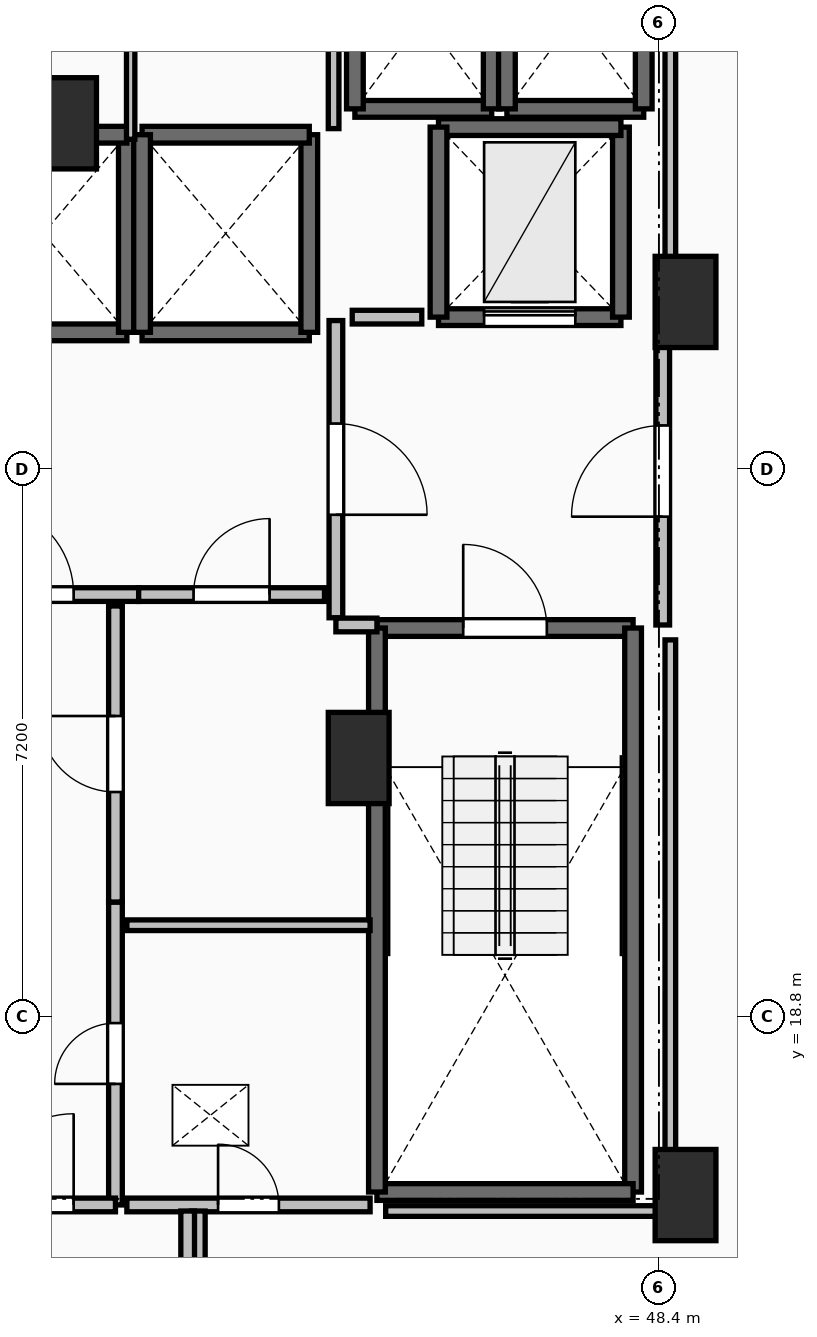
"""IFC4 building model, lengths in metres.
Left out: names, types, materials, properties, quantities, classifications, styles, units other than length and angle.
Written with IfcOpenShell. Run it as: python <this file> out.ifc"""

import sys

from ifc_helpers import new_model, si_unit, direction, frame, frame_2d, origin, origin_2d, place, context, subcontext, project, spatial, rectangle, extrude, element, fill, save


model = new_model("IFC4")
c1 = context("Model", 3, precision=1e-05, world=origin(), true_north=direction((0.0, 1.0)))
c2 = subcontext(c1, "Body", "Model", "MODEL_VIEW")
j1 = project(units=[si_unit("LENGTHUNIT", "METRE"), si_unit("PLANEANGLEUNIT", "RADIAN")], contexts=[c1])
p1 = place(None, origin())
s1 = spatial("IfcSite", under=j1, at=p1, CompositionType="ELEMENT")
p2 = place(p1, origin())
s2 = spatial("IfcBuilding", under=s1, at=p2, CompositionType="ELEMENT")
p3 = place(p2, frame((0.0, 0.0, 41.5)))
s3 = spatial("IfcBuildingStorey", under=s2, at=p3, CompositionType="ELEMENT", Elevation=41.5)
for number, where, z_axis, x_axis in (
    (1, (48.75, 28.2, 0.0), (0.0, 0.0, 1.0), (1.0, 0.0, 0.0)),
    (2, (48.75, 16.45, 0.0), (0.0, 0.0, 1.0), (1.0, 0.0, 0.0)),
    (3, (44.45, 22.2, 0.0), (0.0, 0.0, 1.0), (1.0, 0.0, 0.0)),
    (4, (40.6, 30.55, 0.0), (0.0, 0.0, 1.0), (1.0, 0.0, 0.0)),
):
    element("IfcColumn", number, at=place(p3, frame(where, z_axis=z_axis, x_axis=x_axis)), inside=s3, PredefinedType="PILASTER", context=c2, shape_type="SweptSolid", body=[
        extrude(rectangle(XDim=0.8, YDim=1.2, at=origin_2d()), origin(), (0.0, 0.0, 1.0), 3.5),
    ])
p4 = place(p3, frame((44.69, 23.91, 0.0), z_axis=(0.0, 0.0, 1.0), x_axis=(1.0, 0.0, 0.0)))
e5 = element("IfcWall", 5, at=p4, inside=s3, PredefinedType="SOLIDWALL", context=c2, shape_type="SweptSolid", body=[
    extrude(rectangle(XDim=3.37, YDim=0.22, at=frame_2d((1.685, 0.0))), origin(), (0.0, 0.0, 1.0), 3.24),
])
p5 = place(p4, frame((1.135, 0.0, 0.0)))
e6 = element("IfcOpeningElement", 6, at=p5, cuts=e5, PredefinedType="OPENING", context=c2, shape_type="SweptSolid", body=[
    extrude(rectangle(XDim=1.1, YDim=2.15, at=frame_2d((0.55, 1.075))), frame((0.0, 0.125, 0.0), z_axis=(0.0, -1.0, 0.0), x_axis=(1.0, 0.0, 0.0)), (0.0, 0.0, 1.0), 0.25),
])
p6 = place(p3, frame((48.06, 23.91, 0.0), z_axis=(0.0, 0.0, 1.0), x_axis=(0.0, -1.0, 0.0)))
e7 = element("IfcWall", 7, at=p6, inside=s3, PredefinedType="SOLIDWALL", context=c2, shape_type="SweptSolid", body=[
    extrude(rectangle(XDim=7.42, YDim=0.22, at=frame_2d((3.71, 0.0))), origin(), (0.0, 0.0, 1.0), 3.24),
])
p7 = place(p3, frame((48.06, 16.49, 0.0), z_axis=(0.0, 0.0, 1.0), x_axis=(-1.0, 0.0, 0.0)))
e8 = element("IfcWall", 8, at=p7, inside=s3, PredefinedType="SOLIDWALL", context=c2, shape_type="SweptSolid", body=[
    extrude(rectangle(XDim=3.37, YDim=0.22, at=frame_2d((1.685, 0.0))), origin(), (0.0, 0.0, 1.0), 3.24),
])
p8 = place(p3, frame((44.69, 16.49, 0.0), z_axis=(0.0, 0.0, 1.0), x_axis=(0.0, 1.0, 0.0)))
e9 = element("IfcWall", 9, at=p8, inside=s3, PredefinedType="SOLIDWALL", context=c2, shape_type="SweptSolid", body=[
    extrude(rectangle(XDim=7.42, YDim=0.22, at=frame_2d((3.71, 0.0))), origin(), (0.0, 0.0, 1.0), 3.24),
])
p9 = place(p3, frame((39.2, 27.8, 0.0), z_axis=(0.0, 0.0, 1.0), x_axis=(1.0, 0.0, 0.0)))
e10 = element("IfcWall", 10, at=p9, inside=s3, PredefinedType="SOLIDWALL", context=c2, shape_type="SweptSolid", body=[
    extrude(rectangle(XDim=2.2, YDim=0.22, at=frame_2d((1.1, 0.0))), origin(), (0.0, 0.0, 1.0), 3.24),
])
p10 = place(p3, frame((41.4, 27.8, 0.0), z_axis=(0.0, 0.0, 1.0), x_axis=(0.0, 1.0, 0.0)))
e11 = element("IfcWall", 11, at=p10, inside=s3, PredefinedType="SOLIDWALL", context=c2, shape_type="SweptSolid", body=[
    extrude(rectangle(XDim=2.6, YDim=0.22, at=frame_2d((1.3, 0.0))), origin(), (0.0, 0.0, 1.0), 3.24),
])
for number, where, z_axis, x_axis in (
    (12, (41.4, 30.4, 0.0), (0.0, 0.0, 1.0), (-1.0, 0.0, 0.0)),
    (13, (41.6, 27.8, 0.0), (0.0, 0.0, 1.0), (1.0, 0.0, 0.0)),
):
    element("IfcWall", number, at=place(p3, frame(where, z_axis=z_axis, x_axis=x_axis)), inside=s3, PredefinedType="SOLIDWALL", context=c2, shape_type="SweptSolid", body=[
        extrude(rectangle(XDim=2.2, YDim=0.22, at=frame_2d((1.1, 0.0))), origin(), (0.0, 0.0, 1.0), 3.24),
    ])
p11 = place(p3, frame((43.8, 27.8, 0.0), z_axis=(0.0, 0.0, 1.0), x_axis=(0.0, 1.0, 0.0)))
e14 = element("IfcWall", 14, at=p11, inside=s3, PredefinedType="SOLIDWALL", context=c2, shape_type="SweptSolid", body=[
    extrude(rectangle(XDim=2.6, YDim=0.22, at=frame_2d((1.3, 0.0))), origin(), (0.0, 0.0, 1.0), 3.24),
])
p12 = place(p3, frame((43.8, 30.4, 0.0), z_axis=(0.0, 0.0, 1.0), x_axis=(-1.0, 0.0, 0.0)))
e15 = element("IfcWall", 15, at=p12, inside=s3, PredefinedType="SOLIDWALL", context=c2, shape_type="SweptSolid", body=[
    extrude(rectangle(XDim=2.2, YDim=0.22, at=frame_2d((1.1, 0.0))), origin(), (0.0, 0.0, 1.0), 3.24),
])
p13 = place(p3, frame((41.6, 30.4, 0.0), z_axis=(0.0, 0.0, 1.0), x_axis=(0.0, -1.0, 0.0)))
e16 = element("IfcWall", 16, at=p13, inside=s3, PredefinedType="SOLIDWALL", context=c2, shape_type="SweptSolid", body=[
    extrude(rectangle(XDim=2.6, YDim=0.22, at=frame_2d((1.3, 0.0))), origin(), (0.0, 0.0, 1.0), 3.24),
])
p14 = place(p3, frame((44.4, 30.74, 0.0), z_axis=(0.0, 0.0, 1.0), x_axis=(1.0, 0.0, 0.0)))
e17 = element("IfcWall", 17, at=p14, inside=s3, PredefinedType="SOLIDWALL", context=c2, shape_type="SweptSolid", body=[
    extrude(rectangle(XDim=1.8, YDim=0.22, at=frame_2d((0.9, 0.0))), origin(), (0.0, 0.0, 1.0), 3.24),
])
for number, where, z_axis, x_axis in (
    (18, (46.2, 30.74, 0.0), (0.0, 0.0, 1.0), (0.0, 1.0, 0.0)),
    (19, (44.4, 33.16, 0.0), (0.0, 0.0, 1.0), (0.0, -1.0, 0.0)),
):
    element("IfcWall", number, at=place(p3, frame(where, z_axis=z_axis, x_axis=x_axis)), inside=s3, PredefinedType="SOLIDWALL", context=c2, shape_type="SweptSolid", body=[
        extrude(rectangle(XDim=2.42, YDim=0.22, at=frame_2d((1.21, 0.0))), origin(), (0.0, 0.0, 1.0), 3.24),
    ])
p15 = place(p3, frame((46.4, 30.74, 0.0), z_axis=(0.0, 0.0, 1.0), x_axis=(1.0, 0.0, 0.0)))
e20 = element("IfcWall", 20, at=p15, inside=s3, PredefinedType="SOLIDWALL", context=c2, shape_type="SweptSolid", body=[
    extrude(rectangle(XDim=1.8, YDim=0.22, at=frame_2d((0.9, 0.0))), origin(), (0.0, 0.0, 1.0), 3.24),
])
for number, where, z_axis, x_axis in (
    (21, (48.2, 30.74, 0.0), (0.0, 0.0, 1.0), (0.0, 1.0, 0.0)),
    (22, (46.4, 33.16, 0.0), (0.0, 0.0, 1.0), (0.0, -1.0, 0.0)),
):
    element("IfcWall", number, at=place(p3, frame(where, z_axis=z_axis, x_axis=x_axis)), inside=s3, PredefinedType="SOLIDWALL", context=c2, shape_type="SweptSolid", body=[
        extrude(rectangle(XDim=2.42, YDim=0.22, at=frame_2d((1.21, 0.0))), origin(), (0.0, 0.0, 1.0), 3.24),
    ])
p16 = place(p3, frame((45.5, 28.0, 0.0), z_axis=(0.0, 0.0, 1.0), x_axis=(1.0, 0.0, 0.0)))
e23 = element("IfcWall", 23, at=p16, inside=s3, PredefinedType="SHEAR", context=c2, shape_type="SweptSolid", body=[
    extrude(rectangle(XDim=2.4, YDim=0.22, at=frame_2d((1.2, 0.0))), origin(), (0.0, 0.0, 1.0), 3.24),
])
p17 = place(p16, frame((0.6, 0.0, 0.0)))
e24 = element("IfcOpeningElement", 24, at=p17, cuts=e23, PredefinedType="OPENING", context=c2, shape_type="SweptSolid", body=[
    extrude(rectangle(XDim=1.2, YDim=2.2, at=frame_2d((0.6, 1.1))), frame((0.0, 0.125, 0.0), z_axis=(0.0, -1.0, 0.0), x_axis=(1.0, 0.0, 0.0)), (0.0, 0.0, 1.0), 0.25),
])
p18 = place(p3, frame((47.9, 28.0, 0.0), z_axis=(0.0, 0.0, 1.0), x_axis=(0.0, 1.0, 0.0)))
e25 = element("IfcWall", 25, at=p18, inside=s3, PredefinedType="SHEAR", context=c2, shape_type="SweptSolid", body=[
    extrude(rectangle(XDim=2.5, YDim=0.22, at=frame_2d((1.25, 0.0))), origin(), (0.0, 0.0, 1.0), 3.24),
])
p19 = place(p3, frame((47.9, 30.5, 0.0), z_axis=(0.0, 0.0, 1.0), x_axis=(-1.0, 0.0, 0.0)))
e26 = element("IfcWall", 26, at=p19, inside=s3, PredefinedType="SHEAR", context=c2, shape_type="SweptSolid", body=[
    extrude(rectangle(XDim=2.4, YDim=0.22, at=frame_2d((1.2, 0.0))), origin(), (0.0, 0.0, 1.0), 3.24),
])
p20 = place(p3, frame((45.5, 30.5, 0.0), z_axis=(0.0, 0.0, 1.0), x_axis=(0.0, -1.0, 0.0)))
e27 = element("IfcWall", 27, at=p20, inside=s3, PredefinedType="SHEAR", context=c2, shape_type="SweptSolid", body=[
    extrude(rectangle(XDim=2.5, YDim=0.22, at=frame_2d((1.25, 0.0))), origin(), (0.0, 0.0, 1.0), 3.24),
])
p21 = place(p3, frame((44.15, 27.955, 0.0), z_axis=(0.0, 0.0, 1.0), x_axis=(0.0, -1.0, 0.0)))
e28 = element("IfcWall", 28, at=p21, inside=s3, PredefinedType="PARTITIONING", context=c2, shape_type="SweptSolid", body=[
    extrude(rectangle(XDim=3.91, YDim=0.18, at=frame_2d((1.955, 0.0))), origin(), (0.0, 0.0, 1.0), 3.24),
])
p22 = place(p21, frame((1.355, 0.0, 0.0)))
e29 = element("IfcOpeningElement", 29, at=p22, cuts=e28, PredefinedType="OPENING", context=c2, shape_type="SweptSolid", body=[
    extrude(rectangle(XDim=1.2, YDim=2.15, at=frame_2d((0.6, 1.075))), frame((0.0, 0.105, 0.0), z_axis=(0.0, -1.0, 0.0), x_axis=(1.0, 0.0, 0.0)), (0.0, 0.0, 1.0), 0.21),
])
p23 = place(p3, frame((44.15, 23.95, 0.0), z_axis=(0.0, 0.0, 1.0), x_axis=(1.0, 0.0, 0.0)))
e30 = element("IfcWall", 30, at=p23, inside=s3, PredefinedType="PARTITIONING", context=c2, shape_type="SweptSolid", body=[
    extrude(rectangle(XDim=0.54, YDim=0.18, at=frame_2d((0.27, 0.0))), origin(), (0.0, 0.0, 1.0), 3.24),
])
p24 = place(p3, frame((48.45, 23.95, 0.0), z_axis=(0.0, 0.0, 1.0), x_axis=(0.0, 1.0, 0.0)))
e31 = element("IfcWall", 31, at=p24, inside=s3, PredefinedType="PARTITIONING", context=c2, shape_type="SweptSolid", body=[
    extrude(rectangle(XDim=4.05, YDim=0.18, at=frame_2d((2.025, 0.0))), origin(), (0.0, 0.0, 1.0), 3.24),
])
p25 = place(p24, frame((1.425, 0.0, 0.0)))
e32 = element("IfcOpeningElement", 32, at=p25, cuts=e31, PredefinedType="OPENING", context=c2, shape_type="SweptSolid", body=[
    extrude(rectangle(XDim=1.2, YDim=2.15, at=frame_2d((0.6, 1.075))), frame((0.0, 0.105, 0.0), z_axis=(0.0, -1.0, 0.0), x_axis=(1.0, 0.0, 0.0)), (0.0, 0.0, 1.0), 0.21),
])
p26 = place(p3, frame((38.645, 24.35, 0.0), z_axis=(0.0, 0.0, 1.0), x_axis=(1.0, 0.0, 0.0)))
e33 = element("IfcWall", 33, at=p26, inside=s3, PredefinedType="PARTITIONING", context=c2, shape_type="SweptSolid", body=[
    extrude(rectangle(XDim=2.91, YDim=0.18, at=frame_2d((1.455, 0.0))), origin(), (0.0, 0.0, 1.0), 3.24),
])
p27 = place(p26, frame((0.855, 0.0, 0.0)))
e34 = element("IfcOpeningElement", 34, at=p27, cuts=e33, PredefinedType="OPENING", context=c2, shape_type="SweptSolid", body=[
    extrude(rectangle(XDim=1.2, YDim=2.15, at=frame_2d((0.6, 1.075))), frame((0.0, 0.105, 0.0), z_axis=(0.0, -1.0, 0.0), x_axis=(1.0, 0.0, 0.0)), (0.0, 0.0, 1.0), 0.21),
])
p28 = place(p3, frame((41.555, 24.35, 0.0), z_axis=(0.0, 0.0, 1.0), x_axis=(1.0, 0.0, 0.0)))
e35 = element("IfcWall", 35, at=p28, inside=s3, PredefinedType="PARTITIONING", context=c2, shape_type="SweptSolid", body=[
    extrude(rectangle(XDim=2.445, YDim=0.18, at=frame_2d((1.223, 0.0))), origin(), (0.0, 0.0, 1.0), 3.24),
])
p29 = place(p28, frame((0.722, 0.0, 0.0)))
e36 = element("IfcOpeningElement", 36, at=p29, cuts=e35, PredefinedType="OPENING", context=c2, shape_type="SweptSolid", body=[
    extrude(rectangle(XDim=1.0, YDim=2.15, at=frame_2d((0.5, 1.075))), frame((0.0, 0.105, 0.0), z_axis=(0.0, -1.0, 0.0), x_axis=(1.0, 0.0, 0.0)), (0.0, 0.0, 1.0), 0.21),
])
p30 = place(p3, frame((41.25, 16.32, 0.0), z_axis=(0.0, 0.0, 1.0), x_axis=(0.0, 1.0, 0.0)))
e37 = element("IfcWall", 37, at=p30, inside=s3, PredefinedType="PARTITIONING", context=c2, shape_type="SweptSolid", body=[
    extrude(rectangle(XDim=3.985, YDim=0.18, at=frame_2d((1.992, 0.0))), origin(), (0.0, 0.0, 1.0), 3.24),
])
p31 = place(p30, frame((1.593, 0.0, 0.0)))
e38 = element("IfcOpeningElement", 38, at=p31, cuts=e37, PredefinedType="OPENING", context=c2, shape_type="SweptSolid", body=[
    extrude(rectangle(XDim=0.8, YDim=2.05, at=frame_2d((0.4, 1.025))), frame((0.0, 0.105, 0.0), z_axis=(0.0, -1.0, 0.0), x_axis=(1.0, 0.0, 0.0)), (0.0, 0.0, 1.0), 0.21),
])
p32 = place(p3, frame((41.25, 20.305, 0.0), z_axis=(0.0, 0.0, 1.0), x_axis=(0.0, 1.0, 0.0)))
e39 = element("IfcWall", 39, at=p32, inside=s3, PredefinedType="PARTITIONING", context=c2, shape_type="SweptSolid", body=[
    extrude(rectangle(XDim=3.895, YDim=0.18, at=frame_2d((1.948, 0.0))), origin(), (0.0, 0.0, 1.0), 3.24),
])
p33 = place(p32, frame((1.448, 0.0, 0.0)))
e40 = element("IfcOpeningElement", 40, at=p33, cuts=e39, PredefinedType="OPENING", context=c2, shape_type="SweptSolid", body=[
    extrude(rectangle(XDim=1.0, YDim=2.15, at=frame_2d((0.5, 1.075))), frame((0.0, 0.105, 0.0), z_axis=(0.0, -1.0, 0.0), x_axis=(1.0, 0.0, 0.0)), (0.0, 0.0, 1.0), 0.21),
])
p34 = place(p3, frame((38.95, 16.32, 0.0), z_axis=(0.0, 0.0, 1.0), x_axis=(1.0, 0.0, 0.0)))
e41 = element("IfcWall", 41, at=p34, inside=s3, PredefinedType="PARTITIONING", context=c2, shape_type="SweptSolid", body=[
    extrude(rectangle(XDim=2.3, YDim=0.18, at=frame_2d((1.15, 0.0))), origin(), (0.0, 0.0, 1.0), 3.24),
])
p35 = place(p34, frame((0.55, 0.0, 0.0)))
e42 = element("IfcOpeningElement", 42, at=p35, cuts=e41, PredefinedType="OPENING", context=c2, shape_type="SweptSolid", body=[
    extrude(rectangle(XDim=1.2, YDim=2.15, at=frame_2d((0.6, 1.075))), frame((0.0, 0.105, 0.0), z_axis=(0.0, -1.0, 0.0), x_axis=(1.0, 0.0, 0.0)), (0.0, 0.0, 1.0), 0.21),
])
p36 = place(p3, frame((44.6, 20.0, 0.0), z_axis=(0.0, 0.0, 1.0), x_axis=(-1.0, 0.0, 0.0)))
e43 = element("IfcWall", 43, at=p36, inside=s3, PredefinedType="PARTITIONING", context=c2, shape_type="SweptSolid", body=[
    extrude(rectangle(XDim=3.2, YDim=0.14, at=frame_2d((1.6, 0.0))), origin(), (0.0, 0.0, 1.0), 3.24),
])
p37 = place(p3, frame((41.4, 16.32, 0.0), z_axis=(0.0, 0.0, 1.0), x_axis=(1.0, 0.0, 0.0)))
e44 = element("IfcWall", 44, at=p37, inside=s3, PredefinedType="PARTITIONING", context=c2, shape_type="SweptSolid", body=[
    extrude(rectangle(XDim=3.2, YDim=0.18, at=frame_2d((1.6, 0.0))), origin(), (0.0, 0.0, 1.0), 3.24),
])
p38 = place(p37, frame((1.2, 0.0, 0.0)))
e45 = element("IfcOpeningElement", 45, at=p38, cuts=e44, PredefinedType="OPENING", context=c2, shape_type="SweptSolid", body=[
    extrude(rectangle(XDim=0.8, YDim=2.05, at=frame_2d((0.4, 1.025))), frame((0.0, 0.105, 0.0), z_axis=(0.0, -1.0, 0.0), x_axis=(1.0, 0.0, 0.0)), (0.0, 0.0, 1.0), 0.21),
])
p39 = place(p3, frame((41.45, 30.34, 0.0), z_axis=(0.0, 0.0, 1.0), x_axis=(0.0, 1.0, 0.0)))
e46 = element("IfcWall", 46, at=p39, inside=s3, PredefinedType="PARTITIONING", context=c2, shape_type="SweptSolid", body=[
    extrude(rectangle(XDim=3.56, YDim=0.11, at=frame_2d((1.78, 0.0))), origin(), (0.0, 0.0, 1.0), 3.24),
])
for number, where, z_axis, x_axis in (
    (47, (42.34, 16.24, 0.0), (0.0, 0.0, 1.0), (0.0, -1.0, 0.0)),
    (48, (42.2, 14.1, 0.0), (0.0, 0.0, 1.0), (0.0, 1.0, 0.0)),
):
    element("IfcWall", number, at=place(p3, frame(where, z_axis=z_axis, x_axis=x_axis)), inside=s3, PredefinedType="PARTITIONING", context=c2, shape_type="SweptSolid", body=[
        extrude(rectangle(XDim=2.14, YDim=0.18, at=frame_2d((1.07, 0.0))), origin(), (0.0, 0.0, 1.0), 3.24),
    ])
p40 = place(p3, frame((45.28, 28.0, 0.0), z_axis=(0.0, 0.0, 1.0), x_axis=(-1.0, 0.0, 0.0)))
e49 = element("IfcWall", 49, at=p40, inside=s3, PredefinedType="PARTITIONING", context=c2, shape_type="SweptSolid", body=[
    extrude(rectangle(XDim=0.915, YDim=0.18, at=frame_2d((0.458, 0.0))), origin(), (0.0, 0.0, 1.0), 3.24),
])
p41 = place(p3, frame((44.12, 30.48, 0.0), z_axis=(0.0, 0.0, 1.0), x_axis=(0.0, 1.0, 0.0)))
e50 = element("IfcWall", 50, at=p41, inside=s3, PredefinedType="PARTITIONING", context=c2, shape_type="SweptSolid", body=[
    extrude(rectangle(XDim=2.41, YDim=0.14, at=frame_2d((1.205, 0.0))), origin(), (0.0, 0.0, 1.0), 3.24),
])
p42 = place(p3, frame((48.55, 33.45, 0.0), z_axis=(0.0, 0.0, 1.0), x_axis=(0.0, -1.0, 0.0)))
e51 = element("IfcWall", 51, at=p42, inside=s3, PredefinedType="PARTITIONING", context=c2, shape_type="SweptSolid", body=[
    extrude(rectangle(XDim=5.254, YDim=0.14, at=frame_2d((2.627, 0.0))), origin(), (0.0, 0.0, 1.0), 2.432),
])
p43 = place(p3, frame((48.55, 23.754, 0.0), z_axis=(0.0, 0.0, 1.0), x_axis=(0.0, -1.0, 0.0)))
e52 = element("IfcWall", 52, at=p43, inside=s3, PredefinedType="PARTITIONING", context=c2, shape_type="SweptSolid", body=[
    extrude(rectangle(XDim=7.514, YDim=0.14, at=frame_2d((3.757, 0.0))), origin(), (0.0, 0.0, 1.0), 2.432),
])
p44 = place(p3, frame((48.55, 16.24, 0.0), z_axis=(0.0, 0.0, 1.0), x_axis=(-1.0, 0.0, 0.0)))
e53 = element("IfcWall", 53, at=p44, inside=s3, PredefinedType="PARTITIONING", context=c2, shape_type="SweptSolid", body=[
    extrude(rectangle(XDim=3.745, YDim=0.14, at=frame_2d((1.873, 0.0))), origin(), (0.0, 0.0, 1.0), 2.432),
])
p45 = place(p5, origin())
e54 = element("IfcDoor", 54, at=p45, inside=s3, OperationType="SINGLE_SWING_LEFT", PredefinedType="DOOR", context=c2, shape_type="SweptSolid", body=[
    extrude(rectangle(XDim=1.1, YDim=2.15, at=frame_2d((0.55, 1.075))), frame((0.0, 0.025, 0.0), z_axis=(0.0, -1.0, 0.0), x_axis=(1.0, 0.0, 0.0)), (0.0, 0.0, 1.0), 0.05),
])
fill(e6, e54)
p46 = place(p17, origin())
e55 = element("IfcDoor", 55, at=p46, inside=s3, OperationType="SLIDING_TO_LEFT", PredefinedType="DOOR", context=c2, shape_type="SweptSolid", body=[
    extrude(rectangle(XDim=1.2, YDim=2.2, at=frame_2d((0.6, 1.1))), frame((0.0, 0.025, 0.0), z_axis=(0.0, -1.0, 0.0), x_axis=(1.0, 0.0, 0.0)), (0.0, 0.0, 1.0), 0.05),
])
fill(e24, e55)
p47 = place(p22, origin())
e56 = element("IfcDoor", 56, at=p47, inside=s3, OperationType="SINGLE_SWING_RIGHT", PredefinedType="DOOR", context=c2, shape_type="SweptSolid", body=[
    extrude(rectangle(XDim=1.2, YDim=2.15, at=frame_2d((0.6, 1.075))), frame((0.0, 0.025, 0.0), z_axis=(0.0, -1.0, 0.0), x_axis=(1.0, 0.0, 0.0)), (0.0, 0.0, 1.0), 0.05),
])
fill(e29, e56)
p48 = place(p25, origin())
e57 = element("IfcDoor", 57, at=p48, inside=s3, OperationType="SINGLE_SWING_LEFT", PredefinedType="DOOR", context=c2, shape_type="SweptSolid", body=[
    extrude(rectangle(XDim=1.2, YDim=2.15, at=frame_2d((0.6, 1.075))), frame((0.0, 0.025, 0.0), z_axis=(0.0, -1.0, 0.0), x_axis=(1.0, 0.0, 0.0)), (0.0, 0.0, 1.0), 0.05),
])
fill(e32, e57)
p49 = place(p27, origin())
e58 = element("IfcDoor", 58, at=p49, inside=s3, OperationType="SINGLE_SWING_LEFT", PredefinedType="DOOR", context=c2, shape_type="SweptSolid", body=[
    extrude(rectangle(XDim=1.2, YDim=2.15, at=frame_2d((0.6, 1.075))), frame((0.0, 0.025, 0.0), z_axis=(0.0, -1.0, 0.0), x_axis=(1.0, 0.0, 0.0)), (0.0, 0.0, 1.0), 0.05),
])
fill(e34, e58)
p50 = place(p29, origin())
e59 = element("IfcDoor", 59, at=p50, inside=s3, OperationType="SINGLE_SWING_RIGHT", PredefinedType="DOOR", context=c2, shape_type="SweptSolid", body=[
    extrude(rectangle(XDim=1.0, YDim=2.15, at=frame_2d((0.5, 1.075))), frame((0.0, 0.025, 0.0), z_axis=(0.0, -1.0, 0.0), x_axis=(1.0, 0.0, 0.0)), (0.0, 0.0, 1.0), 0.05),
])
fill(e36, e59)
p51 = place(p31, origin())
e60 = element("IfcDoor", 60, at=p51, inside=s3, OperationType="SINGLE_SWING_LEFT", PredefinedType="DOOR", context=c2, shape_type="SweptSolid", body=[
    extrude(rectangle(XDim=0.8, YDim=2.05, at=frame_2d((0.4, 1.025))), frame((0.0, 0.025, 0.0), z_axis=(0.0, -1.0, 0.0), x_axis=(1.0, 0.0, 0.0)), (0.0, 0.0, 1.0), 0.05),
])
fill(e38, e60)
p52 = place(p33, origin())
e61 = element("IfcDoor", 61, at=p52, inside=s3, OperationType="SINGLE_SWING_RIGHT", PredefinedType="DOOR", context=c2, shape_type="SweptSolid", body=[
    extrude(rectangle(XDim=1.0, YDim=2.15, at=frame_2d((0.5, 1.075))), frame((0.0, 0.025, 0.0), z_axis=(0.0, -1.0, 0.0), x_axis=(1.0, 0.0, 0.0)), (0.0, 0.0, 1.0), 0.05),
])
fill(e40, e61)
p53 = place(p35, origin())
e62 = element("IfcDoor", 62, at=p53, inside=s3, OperationType="SINGLE_SWING_RIGHT", PredefinedType="DOOR", context=c2, shape_type="SweptSolid", body=[
    extrude(rectangle(XDim=1.2, YDim=2.15, at=frame_2d((0.6, 1.075))), frame((0.0, 0.025, 0.0), z_axis=(0.0, -1.0, 0.0), x_axis=(1.0, 0.0, 0.0)), (0.0, 0.0, 1.0), 0.05),
])
fill(e42, e62)
p54 = place(p38, origin())
e63 = element("IfcDoor", 63, at=p54, inside=s3, OperationType="SINGLE_SWING_LEFT", PredefinedType="DOOR", context=c2, shape_type="SweptSolid", body=[
    extrude(rectangle(XDim=0.8, YDim=2.05, at=frame_2d((0.4, 1.025))), frame((0.0, 0.025, 0.0), z_axis=(0.0, -1.0, 0.0), x_axis=(1.0, 0.0, 0.0)), (0.0, 0.0, 1.0), 0.05),
])
fill(e45, e63)
save(model, sys.argv[1])
